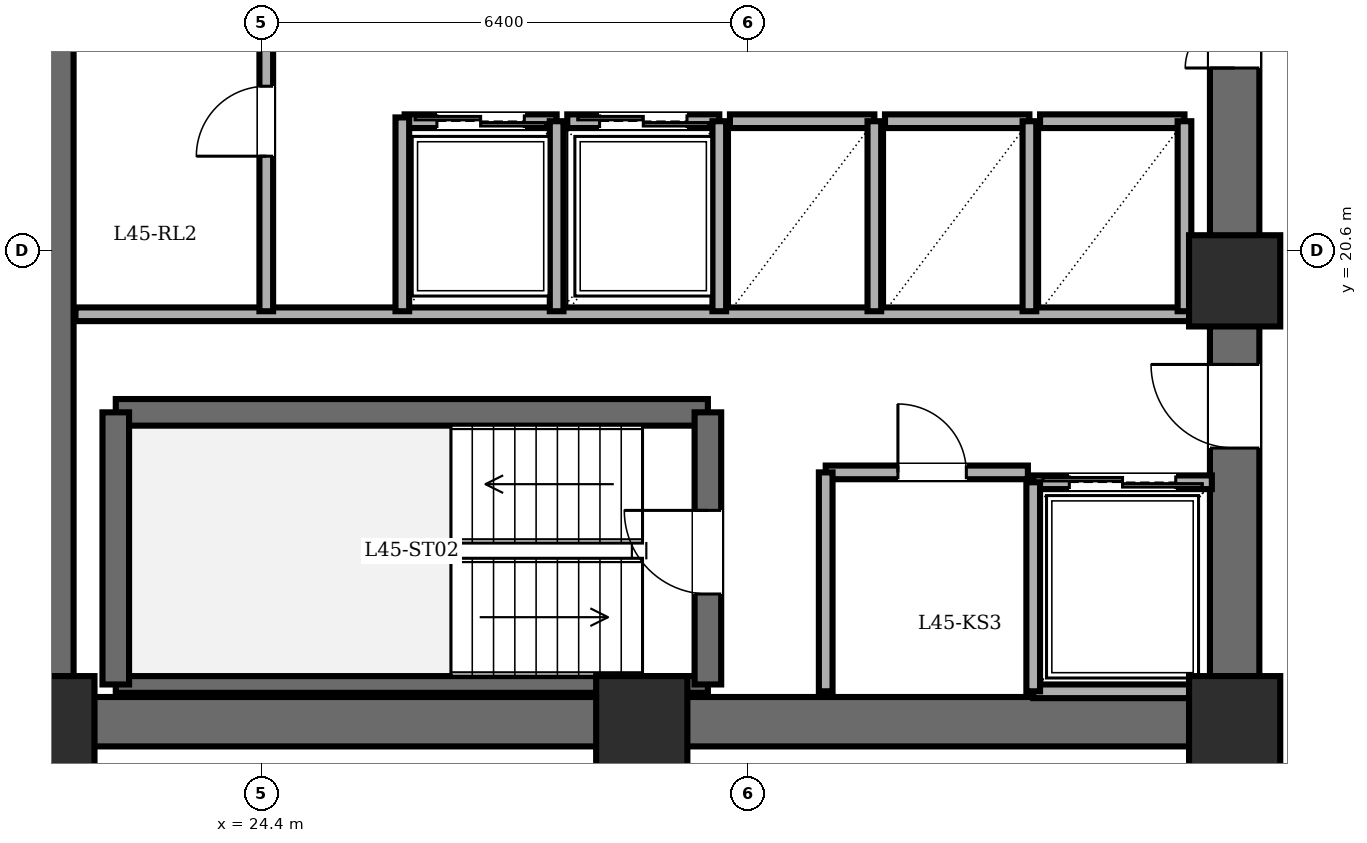
"""IFC4 building model, lengths in metres.
Left out: names, types, materials, properties, quantities, classifications, styles, units other than length and angle.
Written with IfcOpenShell. Run it as: python <this file> out.ifc"""

import sys

from ifc_helpers import new_model, si_unit, direction, frame, frame_2d, origin, origin_2d, place, context, subcontext, project, spatial, rectangle, extrude, element, fill, save


model = new_model("IFC4")
c1 = context("Model", 3, precision=1e-05, world=origin(), true_north=direction((0.0, 1.0)))
c2 = subcontext(c1, "Body", "Model", "MODEL_VIEW")
j1 = project(units=[si_unit("LENGTHUNIT", "METRE"), si_unit("PLANEANGLEUNIT", "RADIAN")], contexts=[c1])
p1 = place(None, origin())
s1 = spatial("IfcSite", under=j1, at=p1, CompositionType="ELEMENT")
p2 = place(p1, origin())
s2 = spatial("IfcBuilding", under=s1, at=p2, CompositionType="ELEMENT")
p3 = place(p2, frame((0.0, 0.0, 172.6)))
s3 = spatial("IfcBuildingStorey", under=s2, at=p3, CompositionType="ELEMENT", Elevation=172.6)
for number, where, z_axis, x_axis in (
    (1, (21.6, 14.4, 0.0), (0.0, 0.0, 1.0), (1.0, 0.0, 0.0)),
    (2, (29.4, 14.4, 0.0), (0.0, 0.0, 1.0), (1.0, 0.0, 0.0)),
    (3, (37.2, 14.4, 0.0), (0.0, 0.0, 1.0), (1.0, 0.0, 0.0)),
    (4, (37.2, 20.2, 0.0), (0.0, 0.0, 1.0), (1.0, 0.0, 0.0)),
):
    element("IfcColumn", number, at=place(p3, frame(where, z_axis=z_axis, x_axis=x_axis)), inside=s3, PredefinedType="COLUMN", context=c2, shape_type="SweptSolid", body=[
        extrude(rectangle(XDim=1.2, YDim=1.2, at=origin_2d()), origin(), (0.0, 0.0, 1.0), 3.6),
    ])
p4 = place(p3, frame((21.6, 14.4, 0.0), z_axis=(0.0, 0.0, 1.0), x_axis=(0.0, 1.0, 0.0)))
e5 = element("IfcWall", 5, at=p4, inside=s3, PredefinedType="SHEAR", context=c2, shape_type="SweptSolid", body=[
    extrude(rectangle(XDim=19.2, YDim=0.65, at=frame_2d((9.6, 0.0))), origin(), (0.0, 0.0, 1.0), 3.4),
])
p5 = place(p3, frame((37.2, 14.4, 0.0), z_axis=(0.0, 0.0, 1.0), x_axis=(-1.0, 0.0, 0.0)))
e6 = element("IfcWall", 6, at=p5, inside=s3, PredefinedType="SHEAR", context=c2, shape_type="SweptSolid", body=[
    extrude(rectangle(XDim=15.6, YDim=0.65, at=frame_2d((7.8, 0.0))), origin(), (0.0, 0.0, 1.0), 3.4),
])
p6 = place(p3, frame((37.2, 14.4, 0.0), z_axis=(0.0, 0.0, 1.0), x_axis=(0.0, 1.0, 0.0)))
e7 = element("IfcWall", 7, at=p6, inside=s3, PredefinedType="SHEAR", context=c2, shape_type="SweptSolid", body=[
    extrude(rectangle(XDim=19.2, YDim=0.65, at=frame_2d((9.6, 0.0))), origin(), (0.0, 0.0, 1.0), 3.4),
])
p7 = place(p6, frame((15.8, 0.0, 0.0)))
e8 = element("IfcOpeningElement", 8, at=p7, cuts=e7, PredefinedType="OPENING", context=c2, shape_type="SweptSolid", body=[
    extrude(rectangle(XDim=1.15, YDim=2.15, at=frame_2d((0.575, 1.075))), frame((0.0, 0.335, 0.0), z_axis=(0.0, -1.0, 0.0), x_axis=(1.0, 0.0, 0.0)), (0.0, 0.0, 1.0), 0.67),
])
p8 = place(p6, frame((3.6, 0.0, 0.0)))
e9 = element("IfcOpeningElement", 9, at=p8, cuts=e7, PredefinedType="OPENING", context=c2, shape_type="SweptSolid", body=[
    extrude(rectangle(XDim=1.1, YDim=2.15, at=frame_2d((0.55, 1.075))), frame((0.0, 0.335, 0.0), z_axis=(0.0, -1.0, 0.0), x_axis=(1.0, 0.0, 0.0)), (0.0, 0.0, 1.0), 0.67),
])
p9 = place(p6, frame((8.6, 0.0, 0.0)))
e10 = element("IfcOpeningElement", 10, at=p9, cuts=e7, PredefinedType="OPENING", context=c2, shape_type="SweptSolid", body=[
    extrude(rectangle(XDim=1.3, YDim=2.2, at=frame_2d((0.65, 1.1))), frame((0.0, 0.335, 0.0), z_axis=(0.0, -1.0, 0.0), x_axis=(1.0, 0.0, 0.0)), (0.0, 0.0, 1.0), 0.67),
])
p10 = place(p3, frame((22.48, 18.47, 0.0), z_axis=(0.0, 0.0, 1.0), x_axis=(1.0, 0.0, 0.0)))
e11 = element("IfcWall", 11, at=p10, inside=s3, PredefinedType="SOLIDWALL", context=c2, shape_type="SweptSolid", body=[
    extrude(rectangle(XDim=7.79, YDim=0.35, at=frame_2d((3.895, 0.0))), origin(), (0.0, 0.0, 1.0), 3.4),
])
p11 = place(p3, frame((22.48, 14.89, 0.0), z_axis=(0.0, 0.0, 1.0), x_axis=(1.0, 0.0, 0.0)))
e12 = element("IfcWall", 12, at=p11, inside=s3, PredefinedType="PARTITIONING", context=c2, shape_type="SweptSolid", body=[
    extrude(rectangle(XDim=7.79, YDim=0.22, at=frame_2d((3.895, 0.0))), origin(), (0.0, 0.0, 1.0), 3.4),
])
p12 = place(p3, frame((22.48, 14.89, 0.0), z_axis=(0.0, 0.0, 1.0), x_axis=(0.0, 1.0, 0.0)))
e13 = element("IfcWall", 13, at=p12, inside=s3, PredefinedType="SOLIDWALL", context=c2, shape_type="SweptSolid", body=[
    extrude(rectangle(XDim=3.58, YDim=0.35, at=frame_2d((1.79, 0.0))), origin(), (0.0, 0.0, 1.0), 3.4),
])
p13 = place(p3, frame((30.27, 14.89, 0.0), z_axis=(0.0, 0.0, 1.0), x_axis=(0.0, 1.0, 0.0)))
e14 = element("IfcWall", 14, at=p13, inside=s3, PredefinedType="SOLIDWALL", context=c2, shape_type="SweptSolid", body=[
    extrude(rectangle(XDim=3.58, YDim=0.35, at=frame_2d((1.79, 0.0))), origin(), (0.0, 0.0, 1.0), 3.4),
])
p14 = place(p13, frame((1.19, 0.0, 0.0)))
e15 = element("IfcOpeningElement", 15, at=p14, cuts=e14, PredefinedType="OPENING", context=c2, shape_type="SweptSolid", body=[
    extrude(rectangle(XDim=1.1, YDim=2.15, at=frame_2d((0.55, 1.075))), frame((0.0, 0.185, 0.0), z_axis=(0.0, -1.0, 0.0), x_axis=(1.0, 0.0, 0.0)), (0.0, 0.0, 1.0), 0.37),
])
p15 = place(p3, frame((21.95, 19.76, 0.0), z_axis=(0.0, 0.0, 1.0), x_axis=(1.0, 0.0, 0.0)))
e16 = element("IfcWall", 16, at=p15, inside=s3, PredefinedType="PARTITIONING", context=c2, shape_type="SweptSolid", body=[
    extrude(rectangle(XDim=14.87, YDim=0.18, at=frame_2d((7.435, 0.0))), origin(), (0.0, 0.0, 1.0), 3.4),
])
p16 = place(p3, frame((31.82, 17.68, 0.0), z_axis=(0.0, 0.0, 1.0), x_axis=(1.0, 0.0, 0.0)))
e17 = element("IfcWall", 17, at=p16, inside=s3, PredefinedType="PARTITIONING", context=c2, shape_type="SweptSolid", body=[
    extrude(rectangle(XDim=2.66, YDim=0.18, at=frame_2d((1.33, 0.0))), origin(), (0.0, 0.0, 1.0), 3.4),
])
p17 = place(p16, frame((0.95, 0.0, 0.0)))
e18 = element("IfcOpeningElement", 18, at=p17, cuts=e17, PredefinedType="OPENING", context=c2, shape_type="SweptSolid", body=[
    extrude(rectangle(XDim=0.9, YDim=2.05, at=frame_2d((0.45, 1.025))), frame((0.0, 0.1, 0.0), z_axis=(0.0, -1.0, 0.0), x_axis=(1.0, 0.0, 0.0)), (0.0, 0.0, 1.0), 0.2),
])
p18 = place(p3, frame((31.82, 14.8, 0.0), z_axis=(0.0, 0.0, 1.0), x_axis=(0.0, 1.0, 0.0)))
e19 = element("IfcWall", 19, at=p18, inside=s3, PredefinedType="PARTITIONING", context=c2, shape_type="SweptSolid", body=[
    extrude(rectangle(XDim=2.88, YDim=0.18, at=frame_2d((1.44, 0.0))), origin(), (0.0, 0.0, 1.0), 3.4),
])
p19 = place(p3, frame((34.55, 17.55, 0.0), z_axis=(0.0, 0.0, 1.0), x_axis=(1.0, 0.0, 0.0)))
e20 = element("IfcWall", 20, at=p19, inside=s3, PredefinedType="PARTITIONING", context=c2, shape_type="SweptSolid", body=[
    extrude(rectangle(XDim=2.35, YDim=0.18, at=frame_2d((1.175, 0.0))), origin(), (0.0, 0.0, 1.0), 3.4),
])
p20 = place(p19, frame((0.475, 0.0, 0.0)))
e21 = element("IfcOpeningElement", 21, at=p20, cuts=e20, PredefinedType="OPENING", context=c2, shape_type="SweptSolid", body=[
    extrude(rectangle(XDim=1.4, YDim=2.3, at=frame_2d((0.7, 1.15))), frame((0.0, 0.1, 0.0), z_axis=(0.0, -1.0, 0.0), x_axis=(1.0, 0.0, 0.0)), (0.0, 0.0, 1.0), 0.2),
])
p21 = place(p3, frame((36.9, 14.8, 0.0), z_axis=(0.0, 0.0, 1.0), x_axis=(-1.0, 0.0, 0.0)))
e22 = element("IfcWall", 22, at=p21, inside=s3, PredefinedType="PARTITIONING", context=c2, shape_type="SweptSolid", body=[
    extrude(rectangle(XDim=2.35, YDim=0.18, at=frame_2d((1.175, 0.0))), origin(), (0.0, 0.0, 1.0), 3.4),
])
p22 = place(p3, frame((34.55, 17.55, 0.0), z_axis=(0.0, 0.0, 1.0), x_axis=(0.0, -1.0, 0.0)))
e23 = element("IfcWall", 23, at=p22, inside=s3, PredefinedType="PARTITIONING", context=c2, shape_type="SweptSolid", body=[
    extrude(rectangle(XDim=2.75, YDim=0.18, at=frame_2d((1.375, 0.0))), origin(), (0.0, 0.0, 1.0), 3.4),
])
p23 = place(p3, frame((26.28, 22.3, 0.0), z_axis=(0.0, 0.0, 1.0), x_axis=(1.0, 0.0, 0.0)))
e24 = element("IfcWall", 24, at=p23, inside=s3, PredefinedType="PARTITIONING", context=c2, shape_type="SweptSolid", body=[
    extrude(rectangle(XDim=2.0, YDim=0.18, at=frame_2d((1.0, 0.0))), origin(), (0.0, 0.0, 1.0), 3.4),
])
p24 = place(p23, frame((0.425, 0.0, 0.0)))
e25 = element("IfcOpeningElement", 25, at=p24, cuts=e24, PredefinedType="OPENING", context=c2, shape_type="SweptSolid", body=[
    extrude(rectangle(XDim=1.15, YDim=2.2, at=frame_2d((0.575, 1.1))), frame((0.0, 0.1, 0.0), z_axis=(0.0, -1.0, 0.0), x_axis=(1.0, 0.0, 0.0)), (0.0, 0.0, 1.0), 0.2),
])
p25 = place(p3, frame((28.28, 19.8, 0.0), z_axis=(0.0, 0.0, 1.0), x_axis=(0.0, 1.0, 0.0)))
e26 = element("IfcWall", 26, at=p25, inside=s3, PredefinedType="PARTITIONING", context=c2, shape_type="SweptSolid", body=[
    extrude(rectangle(XDim=2.5, YDim=0.18, at=frame_2d((1.25, 0.0))), origin(), (0.0, 0.0, 1.0), 3.4),
])
p26 = place(p3, frame((28.42, 22.3, 0.0), z_axis=(0.0, 0.0, 1.0), x_axis=(1.0, 0.0, 0.0)))
e27 = element("IfcWall", 27, at=p26, inside=s3, PredefinedType="PARTITIONING", context=c2, shape_type="SweptSolid", body=[
    extrude(rectangle(XDim=2.0, YDim=0.18, at=frame_2d((1.0, 0.0))), origin(), (0.0, 0.0, 1.0), 3.4),
])
p27 = place(p26, frame((0.425, 0.0, 0.0)))
e28 = element("IfcOpeningElement", 28, at=p27, cuts=e27, PredefinedType="OPENING", context=c2, shape_type="SweptSolid", body=[
    extrude(rectangle(XDim=1.15, YDim=2.2, at=frame_2d((0.575, 1.1))), frame((0.0, 0.1, 0.0), z_axis=(0.0, -1.0, 0.0), x_axis=(1.0, 0.0, 0.0)), (0.0, 0.0, 1.0), 0.2),
])
p28 = place(p3, frame((30.42, 19.8, 0.0), z_axis=(0.0, 0.0, 1.0), x_axis=(0.0, 1.0, 0.0)))
e29 = element("IfcWall", 29, at=p28, inside=s3, PredefinedType="PARTITIONING", context=c2, shape_type="SweptSolid", body=[
    extrude(rectangle(XDim=2.5, YDim=0.18, at=frame_2d((1.25, 0.0))), origin(), (0.0, 0.0, 1.0), 3.4),
])
p29 = place(p3, frame((30.56, 22.3, 0.0), z_axis=(0.0, 0.0, 1.0), x_axis=(1.0, 0.0, 0.0)))
e30 = element("IfcWall", 30, at=p29, inside=s3, PredefinedType="PARTITIONING", context=c2, shape_type="SweptSolid", body=[
    extrude(rectangle(XDim=1.9, YDim=0.18, at=frame_2d((0.95, 0.0))), origin(), (0.0, 0.0, 1.0), 3.4),
])
p30 = place(p3, frame((32.46, 19.8, 0.0), z_axis=(0.0, 0.0, 1.0), x_axis=(0.0, 1.0, 0.0)))
e31 = element("IfcWall", 31, at=p30, inside=s3, PredefinedType="PARTITIONING", context=c2, shape_type="SweptSolid", body=[
    extrude(rectangle(XDim=2.5, YDim=0.18, at=frame_2d((1.25, 0.0))), origin(), (0.0, 0.0, 1.0), 3.4),
])
p31 = place(p3, frame((32.6, 22.3, 0.0), z_axis=(0.0, 0.0, 1.0), x_axis=(1.0, 0.0, 0.0)))
e32 = element("IfcWall", 32, at=p31, inside=s3, PredefinedType="PARTITIONING", context=c2, shape_type="SweptSolid", body=[
    extrude(rectangle(XDim=1.9, YDim=0.18, at=frame_2d((0.95, 0.0))), origin(), (0.0, 0.0, 1.0), 3.4),
])
p32 = place(p3, frame((34.5, 19.8, 0.0), z_axis=(0.0, 0.0, 1.0), x_axis=(0.0, 1.0, 0.0)))
e33 = element("IfcWall", 33, at=p32, inside=s3, PredefinedType="PARTITIONING", context=c2, shape_type="SweptSolid", body=[
    extrude(rectangle(XDim=2.5, YDim=0.18, at=frame_2d((1.25, 0.0))), origin(), (0.0, 0.0, 1.0), 3.4),
])
p33 = place(p3, frame((34.64, 22.3, 0.0), z_axis=(0.0, 0.0, 1.0), x_axis=(1.0, 0.0, 0.0)))
e34 = element("IfcWall", 34, at=p33, inside=s3, PredefinedType="PARTITIONING", context=c2, shape_type="SweptSolid", body=[
    extrude(rectangle(XDim=1.9, YDim=0.18, at=frame_2d((0.95, 0.0))), origin(), (0.0, 0.0, 1.0), 3.4),
])
p34 = place(p3, frame((36.54, 19.8, 0.0), z_axis=(0.0, 0.0, 1.0), x_axis=(0.0, 1.0, 0.0)))
e35 = element("IfcWall", 35, at=p34, inside=s3, PredefinedType="PARTITIONING", context=c2, shape_type="SweptSolid", body=[
    extrude(rectangle(XDim=2.5, YDim=0.18, at=frame_2d((1.25, 0.0))), origin(), (0.0, 0.0, 1.0), 3.4),
])
p35 = place(p3, frame((24.46, 19.8, 0.0), z_axis=(0.0, 0.0, 1.0), x_axis=(0.0, 1.0, 0.0)))
e36 = element("IfcWall", 36, at=p35, inside=s3, PredefinedType="PARTITIONING", context=c2, shape_type="SweptSolid", body=[
    extrude(rectangle(XDim=5.0, YDim=0.18, at=frame_2d((2.5, 0.0))), origin(), (0.0, 0.0, 1.0), 3.4),
])
p36 = place(p35, frame((2.04, 0.0, 0.0)))
e37 = element("IfcOpeningElement", 37, at=p36, cuts=e36, PredefinedType="OPENING", context=c2, shape_type="SweptSolid", body=[
    extrude(rectangle(XDim=0.92, YDim=2.1, at=frame_2d((0.46, 1.05))), frame((0.0, 0.1, 0.0), z_axis=(0.0, -1.0, 0.0), x_axis=(1.0, 0.0, 0.0)), (0.0, 0.0, 1.0), 0.2),
])
p37 = place(p3, frame((26.25, 19.8, 0.0), z_axis=(0.0, 0.0, 1.0), x_axis=(0.0, 1.0, 0.0)))
e38 = element("IfcWall", 38, at=p37, inside=s3, PredefinedType="PARTITIONING", context=c2, shape_type="SweptSolid", body=[
    extrude(rectangle(XDim=2.55, YDim=0.18, at=frame_2d((1.275, 0.0))), origin(), (0.0, 0.0, 1.0), 3.4),
])
p38 = place(p14, origin())
e39 = element("IfcDoor", 39, at=p38, inside=s3, OperationType="SINGLE_SWING_RIGHT", PredefinedType="DOOR", context=c2, shape_type="SweptSolid", body=[
    extrude(rectangle(XDim=1.1, YDim=2.15, at=frame_2d((0.55, 1.075))), frame((0.0, 0.025, 0.0), z_axis=(0.0, -1.0, 0.0), x_axis=(1.0, 0.0, 0.0)), (0.0, 0.0, 1.0), 0.05),
])
fill(e15, e39)
p39 = place(p8, origin())
e40 = element("IfcDoor", 40, at=p39, inside=s3, OperationType="SINGLE_SWING_RIGHT", PredefinedType="DOOR", context=c2, shape_type="SweptSolid", body=[
    extrude(rectangle(XDim=1.1, YDim=2.15, at=frame_2d((0.55, 1.075))), frame((0.0, 0.025, 0.0), z_axis=(0.0, -1.0, 0.0), x_axis=(1.0, 0.0, 0.0)), (0.0, 0.0, 1.0), 0.05),
])
fill(e9, e40)
p40 = place(p17, origin())
e41 = element("IfcDoor", 41, at=p40, inside=s3, OperationType="SINGLE_SWING_LEFT", PredefinedType="DOOR", context=c2, shape_type="SweptSolid", body=[
    extrude(rectangle(XDim=0.9, YDim=2.05, at=frame_2d((0.45, 1.025))), frame((0.0, 0.025, 0.0), z_axis=(0.0, -1.0, 0.0), x_axis=(1.0, 0.0, 0.0)), (0.0, 0.0, 1.0), 0.05),
])
fill(e18, e41)
p41 = place(p20, origin())
e42 = element("IfcDoor", 42, at=p41, inside=s3, OperationType="DOUBLE_DOOR_SLIDING", PredefinedType="DOOR", context=c2, shape_type="SweptSolid", body=[
    extrude(rectangle(XDim=1.4, YDim=2.3, at=frame_2d((0.7, 1.15))), frame((0.0, 0.025, 0.0), z_axis=(0.0, -1.0, 0.0), x_axis=(1.0, 0.0, 0.0)), (0.0, 0.0, 1.0), 0.05),
])
fill(e21, e42)
p42 = place(p24, origin())
e43 = element("IfcDoor", 43, at=p42, inside=s3, OperationType="DOUBLE_DOOR_SLIDING", PredefinedType="DOOR", context=c2, shape_type="SweptSolid", body=[
    extrude(rectangle(XDim=1.15, YDim=2.2, at=frame_2d((0.575, 1.1))), frame((0.0, 0.025, 0.0), z_axis=(0.0, -1.0, 0.0), x_axis=(1.0, 0.0, 0.0)), (0.0, 0.0, 1.0), 0.05),
])
fill(e25, e43)
p43 = place(p27, origin())
e44 = element("IfcDoor", 44, at=p43, inside=s3, OperationType="DOUBLE_DOOR_SLIDING", PredefinedType="DOOR", context=c2, shape_type="SweptSolid", body=[
    extrude(rectangle(XDim=1.15, YDim=2.2, at=frame_2d((0.575, 1.1))), frame((0.0, 0.025, 0.0), z_axis=(0.0, -1.0, 0.0), x_axis=(1.0, 0.0, 0.0)), (0.0, 0.0, 1.0), 0.05),
])
fill(e28, e44)
p44 = place(p36, origin())
e45 = element("IfcDoor", 45, at=p44, inside=s3, OperationType="SINGLE_SWING_LEFT", PredefinedType="DOOR", context=c2, shape_type="SweptSolid", body=[
    extrude(rectangle(XDim=0.92, YDim=2.1, at=frame_2d((0.46, 1.05))), frame((0.0, 0.025, 0.0), z_axis=(0.0, -1.0, 0.0), x_axis=(1.0, 0.0, 0.0)), (0.0, 0.0, 1.0), 0.05),
])
fill(e37, e45)
p45 = place(p9, origin())
e46 = element("IfcDoor", 46, at=p45, inside=s3, OperationType="DOUBLE_DOOR_SINGLE_SWING", PredefinedType="DOOR", context=c2, shape_type="SweptSolid", body=[
    extrude(rectangle(XDim=1.3, YDim=2.2, at=frame_2d((0.65, 1.1))), frame((0.0, 0.025, 0.0), z_axis=(0.0, -1.0, 0.0), x_axis=(1.0, 0.0, 0.0)), (0.0, 0.0, 1.0), 0.05),
])
fill(e10, e46)
save(model, sys.argv[1])
